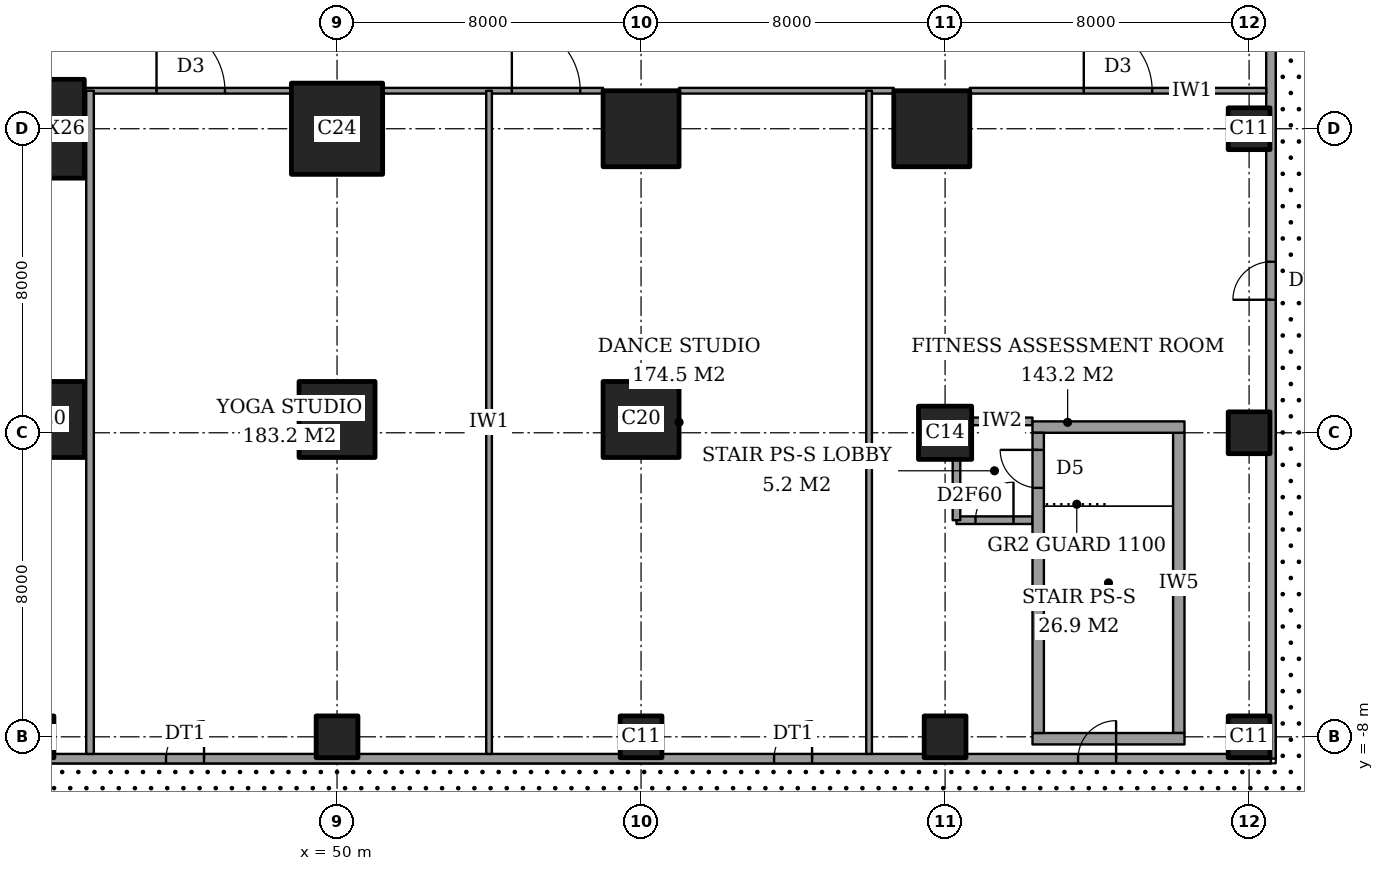
"""IFC4 building model, lengths in metres.
Left out: names, types, materials, properties, quantities, classifications, styles, units other than length and angle.
Written with IfcOpenShell. Run it as: python <this file> out.ifc"""

import sys

from ifc_helpers import new_model, si_unit, direction, frame, frame_2d, origin, origin_2d, place, context, subcontext, project, spatial, rectangle, extrude, element, fill, save


model = new_model("IFC4")
c1 = context("Model", 3, precision=1e-05, world=origin(), true_north=direction((0.0, 1.0)))
c2 = subcontext(c1, "Body", "Model", "MODEL_VIEW")
j1 = project(units=[si_unit("LENGTHUNIT", "METRE"), si_unit("PLANEANGLEUNIT", "RADIAN")], contexts=[c1])
p1 = place(None, origin())
s1 = spatial("IfcSite", under=j1, at=p1, CompositionType="ELEMENT")
p2 = place(p1, origin())
s2 = spatial("IfcBuilding", under=s1, at=p2, CompositionType="ELEMENT")
p3 = place(p2, frame((0.0, 0.0, 11.0)))
s3 = spatial("IfcBuildingStorey", under=s2, at=p3, CompositionType="ELEMENT", Elevation=11.0)
p4 = place(p3, frame((42.0, -8.0, 0.0), z_axis=(0.0, 0.0, 1.0), x_axis=(1.0, 0.0, 0.0)))
e1 = element("IfcColumn", 1, at=p4, inside=s3, PredefinedType="COLUMN", context=c2, shape_type="SweptSolid", body=[
    extrude(rectangle(XDim=1.1, YDim=1.1, at=origin_2d()), origin(), (0.0, 0.0, 1.0), 5.0),
])
p5 = place(p3, frame((42.35, 0.35, 0.0), z_axis=(0.0, 0.0, 1.0), x_axis=(1.0, 0.0, 0.0)))
e2 = element("IfcColumn", 2, at=p5, inside=s3, PredefinedType="COLUMN", context=c2, shape_type="SweptSolid", body=[
    extrude(rectangle(XDim=2.0, YDim=2.0, at=origin_2d()), origin(), (0.0, 0.0, 1.0), 5.0),
])
p6 = place(p3, frame((42.35, 8.0, 0.0), z_axis=(0.0, 0.0, 1.0), x_axis=(1.0, 0.0, 0.0)))
e3 = element("IfcColumn", 3, at=p6, inside=s3, PredefinedType="COLUMN", context=c2, shape_type="SweptSolid", body=[
    extrude(rectangle(XDim=2.0, YDim=2.6, at=origin_2d()), origin(), (0.0, 0.0, 1.0), 5.0),
])
p7 = place(p3, frame((50.0, -8.0, 0.0), z_axis=(0.0, 0.0, 1.0), x_axis=(1.0, 0.0, 0.0)))
e4 = element("IfcColumn", 4, at=p7, inside=s3, PredefinedType="COLUMN", context=c2, shape_type="SweptSolid", body=[
    extrude(rectangle(XDim=1.1, YDim=1.1, at=origin_2d()), origin(), (0.0, 0.0, 1.0), 5.0),
])
p8 = place(p3, frame((50.0, 0.35, 0.0), z_axis=(0.0, 0.0, 1.0), x_axis=(1.0, 0.0, 0.0)))
e5 = element("IfcColumn", 5, at=p8, inside=s3, PredefinedType="COLUMN", context=c2, shape_type="SweptSolid", body=[
    extrude(rectangle(XDim=2.0, YDim=2.0, at=origin_2d()), origin(), (0.0, 0.0, 1.0), 5.0),
])
p9 = place(p3, frame((50.0, 8.0, 0.0), z_axis=(0.0, 0.0, 1.0), x_axis=(1.0, 0.0, 0.0)))
e6 = element("IfcColumn", 6, at=p9, inside=s3, PredefinedType="COLUMN", context=c2, shape_type="SweptSolid", body=[
    extrude(rectangle(XDim=2.4, YDim=2.4, at=origin_2d()), origin(), (0.0, 0.0, 1.0), 5.0),
])
p10 = place(p3, frame((58.0, -8.0, 0.0), z_axis=(0.0, 0.0, 1.0), x_axis=(1.0, 0.0, 0.0)))
e7 = element("IfcColumn", 7, at=p10, inside=s3, PredefinedType="COLUMN", context=c2, shape_type="SweptSolid", body=[
    extrude(rectangle(XDim=1.1, YDim=1.1, at=origin_2d()), origin(), (0.0, 0.0, 1.0), 5.0),
])
for number, where, z_axis, x_axis in (
    (8, (58.0, 0.35, 0.0), (0.0, 0.0, 1.0), (1.0, 0.0, 0.0)),
    (9, (58.0, 8.0, 0.0), (0.0, 0.0, 1.0), (1.0, 0.0, 0.0)),
):
    element("IfcColumn", number, at=place(p3, frame(where, z_axis=z_axis, x_axis=x_axis)), inside=s3, PredefinedType="COLUMN", context=c2, shape_type="SweptSolid", body=[
        extrude(rectangle(XDim=2.0, YDim=2.0, at=origin_2d()), origin(), (0.0, 0.0, 1.0), 5.0),
    ])
p11 = place(p3, frame((66.0, -8.0, 0.0), z_axis=(0.0, 0.0, 1.0), x_axis=(1.0, 0.0, 0.0)))
e10 = element("IfcColumn", 10, at=p11, inside=s3, PredefinedType="COLUMN", context=c2, shape_type="SweptSolid", body=[
    extrude(rectangle(XDim=1.1, YDim=1.1, at=origin_2d()), origin(), (0.0, 0.0, 1.0), 5.0),
])
p12 = place(p3, frame((66.0, 0.0, 0.0), z_axis=(0.0, 0.0, 1.0), x_axis=(1.0, 0.0, 0.0)))
e11 = element("IfcColumn", 11, at=p12, inside=s3, PredefinedType="COLUMN", context=c2, shape_type="SweptSolid", body=[
    extrude(rectangle(XDim=1.4, YDim=1.4, at=origin_2d()), origin(), (0.0, 0.0, 1.0), 5.0),
])
p13 = place(p3, frame((65.65, 8.0, 0.0), z_axis=(0.0, 0.0, 1.0), x_axis=(1.0, 0.0, 0.0)))
e12 = element("IfcColumn", 12, at=p13, inside=s3, PredefinedType="COLUMN", context=c2, shape_type="SweptSolid", body=[
    extrude(rectangle(XDim=2.0, YDim=2.0, at=origin_2d()), origin(), (0.0, 0.0, 1.0), 5.0),
])
for number, where, z_axis, x_axis in (
    (13, (74.0, -8.0, 0.0), (0.0, 0.0, 1.0), (1.0, 0.0, 0.0)),
    (14, (74.0, 0.0, 0.0), (0.0, 0.0, 1.0), (1.0, 0.0, 0.0)),
    (15, (74.0, 8.0, 0.0), (0.0, 0.0, 1.0), (1.0, 0.0, 0.0)),
):
    element("IfcColumn", number, at=place(p3, frame(where, z_axis=z_axis, x_axis=x_axis)), inside=s3, PredefinedType="COLUMN", context=c2, shape_type="SweptSolid", body=[
        extrude(rectangle(XDim=1.1, YDim=1.1, at=origin_2d()), origin(), (0.0, 0.0, 1.0), 5.0),
    ])
p14 = place(p3, frame((74.575, -8.575, 0.0), z_axis=(0.0, 0.0, 1.0), x_axis=(0.0, 1.0, 0.0)))
e16 = element("IfcWall", 16, at=p14, inside=s3, PredefinedType="SOLIDWALL", context=c2, shape_type="SweptSolid", body=[
    extrude(rectangle(XDim=65.15, YDim=0.25, at=frame_2d((32.575, 0.0))), origin(), (0.0, 0.0, 1.0), 5.0),
])
p15 = place(p14, frame((12.075, 0.0, 0.0)))
e17 = element("IfcOpeningElement", 17, at=p15, cuts=e16, PredefinedType="OPENING", context=c2, shape_type="SweptSolid", body=[
    extrude(rectangle(XDim=1.0, YDim=2.4, at=frame_2d((0.5, 1.2))), frame((0.0, 0.135, 0.0), z_axis=(0.0, -1.0, 0.0), x_axis=(1.0, 0.0, 0.0)), (0.0, 0.0, 1.0), 0.27),
])
p16 = place(p14, frame((28.075, 0.0, 0.0)))
e18 = element("IfcOpeningElement", 18, at=p16, cuts=e16, PredefinedType="OPENING", context=c2, shape_type="SweptSolid", body=[
    extrude(rectangle(XDim=1.0, YDim=2.4, at=frame_2d((0.5, 1.2))), frame((0.0, 0.135, 0.0), z_axis=(0.0, -1.0, 0.0), x_axis=(1.0, 0.0, 0.0)), (0.0, 0.0, 1.0), 0.27),
])
p17 = place(p14, frame((41.275, 0.0, 0.0)))
e19 = element("IfcOpeningElement", 19, at=p17, cuts=e16, PredefinedType="OPENING", context=c2, shape_type="SweptSolid", body=[
    extrude(rectangle(XDim=1.0, YDim=2.4, at=frame_2d((0.5, 1.2))), frame((0.0, 0.135, 0.0), z_axis=(0.0, -1.0, 0.0), x_axis=(1.0, 0.0, 0.0)), (0.0, 0.0, 1.0), 0.27),
])
p18 = place(p3, frame((-8.575, -8.575, 0.0), z_axis=(0.0, 0.0, 1.0), x_axis=(1.0, 0.0, 0.0)))
e20 = element("IfcWall", 20, at=p18, inside=s3, PredefinedType="SOLIDWALL", context=c2, shape_type="SweptSolid", body=[
    extrude(rectangle(XDim=83.15, YDim=0.25, at=frame_2d((41.575, 0.0))), origin(), (0.0, 0.0, 1.0), 5.0),
])
p19 = place(p18, frame((12.075, 0.0, 0.0)))
e21 = element("IfcOpeningElement", 21, at=p19, cuts=e20, PredefinedType="OPENING", context=c2, shape_type="SweptSolid", body=[
    extrude(rectangle(XDim=1.0, YDim=2.4, at=frame_2d((0.5, 1.2))), frame((0.0, 0.135, 0.0), z_axis=(0.0, -1.0, 0.0), x_axis=(1.0, 0.0, 0.0)), (0.0, 0.0, 1.0), 0.27),
])
p20 = place(p18, frame((20.075, 0.0, 0.0)))
e22 = element("IfcOpeningElement", 22, at=p20, cuts=e20, PredefinedType="OPENING", context=c2, shape_type="SweptSolid", body=[
    extrude(rectangle(XDim=1.0, YDim=2.4, at=frame_2d((0.5, 1.2))), frame((0.0, 0.135, 0.0), z_axis=(0.0, -1.0, 0.0), x_axis=(1.0, 0.0, 0.0)), (0.0, 0.0, 1.0), 0.27),
])
p21 = place(p18, frame((28.075, 0.0, 0.0)))
e23 = element("IfcOpeningElement", 23, at=p21, cuts=e20, PredefinedType="OPENING", context=c2, shape_type="SweptSolid", body=[
    extrude(rectangle(XDim=1.0, YDim=2.4, at=frame_2d((0.5, 1.2))), frame((0.0, 0.135, 0.0), z_axis=(0.0, -1.0, 0.0), x_axis=(1.0, 0.0, 0.0)), (0.0, 0.0, 1.0), 0.27),
])
p22 = place(p18, frame((54.075, 0.0, 0.0)))
e24 = element("IfcOpeningElement", 24, at=p22, cuts=e20, PredefinedType="OPENING", context=c2, shape_type="SweptSolid", body=[
    extrude(rectangle(XDim=1.0, YDim=2.4, at=frame_2d((0.5, 1.2))), frame((0.0, 0.135, 0.0), z_axis=(0.0, -1.0, 0.0), x_axis=(1.0, 0.0, 0.0)), (0.0, 0.0, 1.0), 0.27),
])
p23 = place(p18, frame((70.075, 0.0, 0.0)))
e25 = element("IfcOpeningElement", 25, at=p23, cuts=e20, PredefinedType="OPENING", context=c2, shape_type="SweptSolid", body=[
    extrude(rectangle(XDim=1.0, YDim=2.4, at=frame_2d((0.5, 1.2))), frame((0.0, 0.135, 0.0), z_axis=(0.0, -1.0, 0.0), x_axis=(1.0, 0.0, 0.0)), (0.0, 0.0, 1.0), 0.27),
])
p24 = place(p18, frame((78.075, 0.0, 0.0)))
e26 = element("IfcOpeningElement", 26, at=p24, cuts=e20, PredefinedType="OPENING", context=c2, shape_type="SweptSolid", body=[
    extrude(rectangle(XDim=1.0, YDim=2.4, at=frame_2d((0.5, 1.2))), frame((0.0, 0.135, 0.0), z_axis=(0.0, -1.0, 0.0), x_axis=(1.0, 0.0, 0.0)), (0.0, 0.0, 1.0), 0.27),
])
p25 = place(p3, frame((66.3, -2.3, 0.0), z_axis=(0.0, 0.0, 1.0), x_axis=(1.0, 0.0, 0.0)))
e27 = element("IfcWall", 27, at=p25, inside=s3, PredefinedType="PARTITIONING", context=c2, shape_type="SweptSolid", body=[
    extrude(rectangle(XDim=2.0, YDim=0.2, at=frame_2d((1.0, 0.0))), origin(), (0.0, 0.0, 1.0), 4.7),
])
p26 = place(p25, frame((0.5, 0.0, 0.0)))
e28 = element("IfcOpeningElement", 28, at=p26, cuts=e27, PredefinedType="OPENING", context=c2, shape_type="SweptSolid", body=[
    extrude(rectangle(XDim=1.0, YDim=2.1, at=frame_2d((0.5, 1.05))), frame((0.0, 0.11, 0.0), z_axis=(0.0, -1.0, 0.0), x_axis=(1.0, 0.0, 0.0)), (0.0, 0.0, 1.0), 0.22),
])
p27 = place(p3, frame((66.7, 0.3, 0.0), z_axis=(0.0, 0.0, 1.0), x_axis=(1.0, 0.0, 0.0)))
e29 = element("IfcWall", 29, at=p27, inside=s3, PredefinedType="PARTITIONING", context=c2, shape_type="SweptSolid", body=[
    extrude(rectangle(XDim=1.6, YDim=0.2, at=frame_2d((0.8, 0.0))), origin(), (0.0, 0.0, 1.0), 3.3),
])
p28 = place(p3, frame((43.35, 9.0, 0.0), z_axis=(0.0, 0.0, 1.0), x_axis=(1.0, 0.0, 0.0)))
e30 = element("IfcWall", 30, at=p28, inside=s3, PredefinedType="PARTITIONING", context=c2, shape_type="SweptSolid", body=[
    extrude(rectangle(XDim=5.45, YDim=0.15, at=frame_2d((2.725, 0.0))), origin(), (0.0, 0.0, 1.0), 4.7),
])
p29 = place(p28, frame((1.9, 0.0, 0.0)))
e31 = element("IfcOpeningElement", 31, at=p29, cuts=e30, PredefinedType="OPENING", context=c2, shape_type="SweptSolid", body=[
    extrude(rectangle(XDim=1.8, YDim=2.1, at=frame_2d((0.9, 1.05))), frame((0.0, 0.085, 0.0), z_axis=(0.0, -1.0, 0.0), x_axis=(1.0, 0.0, 0.0)), (0.0, 0.0, 1.0), 0.17),
])
p30 = place(p3, frame((51.2, 9.0, 0.0), z_axis=(0.0, 0.0, 1.0), x_axis=(1.0, 0.0, 0.0)))
e32 = element("IfcWall", 32, at=p30, inside=s3, PredefinedType="PARTITIONING", context=c2, shape_type="SweptSolid", body=[
    extrude(rectangle(XDim=5.8, YDim=0.15, at=frame_2d((2.9, 0.0))), origin(), (0.0, 0.0, 1.0), 4.7),
])
p31 = place(p30, frame((3.4, 0.0, 0.0)))
e33 = element("IfcOpeningElement", 33, at=p31, cuts=e32, PredefinedType="OPENING", context=c2, shape_type="SweptSolid", body=[
    extrude(rectangle(XDim=1.8, YDim=2.1, at=frame_2d((0.9, 1.05))), frame((0.0, 0.085, 0.0), z_axis=(0.0, -1.0, 0.0), x_axis=(1.0, 0.0, 0.0)), (0.0, 0.0, 1.0), 0.17),
])
p32 = place(p3, frame((59.0, 9.0, 0.0), z_axis=(0.0, 0.0, 1.0), x_axis=(1.0, 0.0, 0.0)))
e34 = element("IfcWall", 34, at=p32, inside=s3, PredefinedType="PARTITIONING", context=c2, shape_type="SweptSolid", body=[
    extrude(rectangle(XDim=5.65, YDim=0.15, at=frame_2d((2.825, 0.0))), origin(), (0.0, 0.0, 1.0), 4.7),
])
p33 = place(p3, frame((66.65, 9.0, 0.0), z_axis=(0.0, 0.0, 1.0), x_axis=(1.0, 0.0, 0.0)))
e35 = element("IfcWall", 35, at=p33, inside=s3, PredefinedType="PARTITIONING", context=c2, shape_type="SweptSolid", body=[
    extrude(rectangle(XDim=7.8, YDim=0.15, at=frame_2d((3.9, 0.0))), origin(), (0.0, 0.0, 1.0), 4.7),
])
p34 = place(p33, frame((3.0, 0.0, 0.0)))
e36 = element("IfcOpeningElement", 36, at=p34, cuts=e35, PredefinedType="OPENING", context=c2, shape_type="SweptSolid", body=[
    extrude(rectangle(XDim=1.8, YDim=2.1, at=frame_2d((0.9, 1.05))), frame((0.0, 0.085, 0.0), z_axis=(0.0, -1.0, 0.0), x_axis=(1.0, 0.0, 0.0)), (0.0, 0.0, 1.0), 0.17),
])
p35 = place(p3, frame((43.5, -8.45, 0.0), z_axis=(0.0, 0.0, 1.0), x_axis=(0.0, 1.0, 0.0)))
e37 = element("IfcWall", 37, at=p35, inside=s3, PredefinedType="PARTITIONING", context=c2, shape_type="SweptSolid", body=[
    extrude(rectangle(XDim=17.45, YDim=0.2, at=frame_2d((8.725, 0.0))), origin(), (0.0, 0.0, 1.0), 4.7),
])
for number, where, z_axis, x_axis in (
    (38, (54.0, -8.45, 0.0), (0.0, 0.0, 1.0), (0.0, 1.0, 0.0)),
    (39, (64.0, -8.45, 0.0), (0.0, 0.0, 1.0), (0.0, 1.0, 0.0)),
):
    element("IfcWall", number, at=place(p3, frame(where, z_axis=z_axis, x_axis=x_axis)), inside=s3, PredefinedType="PARTITIONING", context=c2, shape_type="SweptSolid", body=[
        extrude(rectangle(XDim=17.45, YDim=0.15, at=frame_2d((8.725, 0.0))), origin(), (0.0, 0.0, 1.0), 4.7),
    ])
p36 = place(p3, frame((66.3, -2.3, 0.0), z_axis=(0.0, 0.0, 1.0), x_axis=(0.0, 1.0, 0.0)))
e40 = element("IfcWall", 40, at=p36, inside=s3, PredefinedType="PARTITIONING", context=c2, shape_type="SweptSolid", body=[
    extrude(rectangle(XDim=1.6, YDim=0.2, at=frame_2d((0.8, 0.0))), origin(), (0.0, 0.0, 1.0), 3.3),
])
for number, where, z_axis, x_axis in (
    (41, (68.3, -8.05, 0.0), (0.0, 0.0, 1.0), (1.0, 0.0, 0.0)),
    (42, (68.3, 0.15, 0.0), (0.0, 0.0, 1.0), (1.0, 0.0, 0.0)),
):
    element("IfcWall", number, at=place(p3, frame(where, z_axis=z_axis, x_axis=x_axis)), inside=s3, PredefinedType="PARTITIONING", context=c2, shape_type="SweptSolid", body=[
        extrude(rectangle(XDim=4.0, YDim=0.3, at=frame_2d((2.0, 0.0))), origin(), (0.0, 0.0, 1.0), 4.7),
    ])
p37 = place(p3, frame((68.45, -7.9, 0.0), z_axis=(0.0, 0.0, 1.0), x_axis=(0.0, 1.0, 0.0)))
e43 = element("IfcWall", 43, at=p37, inside=s3, PredefinedType="PARTITIONING", context=c2, shape_type="SweptSolid", body=[
    extrude(rectangle(XDim=7.9, YDim=0.3, at=frame_2d((3.95, 0.0))), origin(), (0.0, 0.0, 1.0), 4.7),
])
p38 = place(p37, frame((6.45, 0.0, 0.0)))
e44 = element("IfcOpeningElement", 44, at=p38, cuts=e43, PredefinedType="OPENING", context=c2, shape_type="SweptSolid", body=[
    extrude(rectangle(XDim=1.0, YDim=2.1, at=frame_2d((0.5, 1.05))), frame((0.0, 0.16, 0.0), z_axis=(0.0, -1.0, 0.0), x_axis=(1.0, 0.0, 0.0)), (0.0, 0.0, 1.0), 0.32),
])
p39 = place(p3, frame((72.15, -7.9, 0.0), z_axis=(0.0, 0.0, 1.0), x_axis=(0.0, 1.0, 0.0)))
e45 = element("IfcWall", 45, at=p39, inside=s3, PredefinedType="PARTITIONING", context=c2, shape_type="SweptSolid", body=[
    extrude(rectangle(XDim=7.9, YDim=0.3, at=frame_2d((3.95, 0.0))), origin(), (0.0, 0.0, 1.0), 4.7),
])
p40 = place(p15, origin())
e46 = element("IfcDoor", 46, at=p40, inside=s3, OperationType="SINGLE_SWING_RIGHT", PredefinedType="DOOR", context=c2, shape_type="SweptSolid", body=[
    extrude(rectangle(XDim=1.0, YDim=2.4, at=frame_2d((0.5, 1.2))), frame((0.0, 0.025, 0.0), z_axis=(0.0, -1.0, 0.0), x_axis=(1.0, 0.0, 0.0)), (0.0, 0.0, 1.0), 0.05),
])
fill(e17, e46)
p41 = place(p22, origin())
e47 = element("IfcDoor", 47, at=p41, inside=s3, OperationType="SINGLE_SWING_LEFT", PredefinedType="DOOR", context=c2, shape_type="SweptSolid", body=[
    extrude(rectangle(XDim=1.0, YDim=2.4, at=frame_2d((0.5, 1.2))), frame((0.0, 0.025, 0.0), z_axis=(0.0, -1.0, 0.0), x_axis=(1.0, 0.0, 0.0)), (0.0, 0.0, 1.0), 0.05),
])
fill(e24, e47)
p42 = place(p23, origin())
e48 = element("IfcDoor", 48, at=p42, inside=s3, OperationType="SINGLE_SWING_LEFT", PredefinedType="DOOR", context=c2, shape_type="SweptSolid", body=[
    extrude(rectangle(XDim=1.0, YDim=2.4, at=frame_2d((0.5, 1.2))), frame((0.0, 0.025, 0.0), z_axis=(0.0, -1.0, 0.0), x_axis=(1.0, 0.0, 0.0)), (0.0, 0.0, 1.0), 0.05),
])
fill(e25, e48)
p43 = place(p24, origin())
e49 = element("IfcDoor", 49, at=p43, inside=s3, OperationType="SINGLE_SWING_LEFT", PredefinedType="DOOR", context=c2, shape_type="SweptSolid", body=[
    extrude(rectangle(XDim=1.0, YDim=2.4, at=frame_2d((0.5, 1.2))), frame((0.0, 0.025, 0.0), z_axis=(0.0, -1.0, 0.0), x_axis=(1.0, 0.0, 0.0)), (0.0, 0.0, 1.0), 0.05),
])
fill(e26, e49)
p44 = place(p29, origin())
e50 = element("IfcDoor", 50, at=p44, inside=s3, OperationType="DOUBLE_DOOR_DOUBLE_SWING", PredefinedType="DOOR", context=c2, shape_type="SweptSolid", body=[
    extrude(rectangle(XDim=1.8, YDim=2.1, at=frame_2d((0.9, 1.05))), frame((0.0, 0.025, 0.0), z_axis=(0.0, -1.0, 0.0), x_axis=(1.0, 0.0, 0.0)), (0.0, 0.0, 1.0), 0.05),
])
fill(e31, e50)
p45 = place(p31, origin())
e51 = element("IfcDoor", 51, at=p45, inside=s3, OperationType="DOUBLE_DOOR_DOUBLE_SWING", PredefinedType="DOOR", context=c2, shape_type="SweptSolid", body=[
    extrude(rectangle(XDim=1.8, YDim=2.1, at=frame_2d((0.9, 1.05))), frame((0.0, 0.025, 0.0), z_axis=(0.0, -1.0, 0.0), x_axis=(1.0, 0.0, 0.0)), (0.0, 0.0, 1.0), 0.05),
])
fill(e33, e51)
p46 = place(p34, origin())
e52 = element("IfcDoor", 52, at=p46, inside=s3, OperationType="DOUBLE_DOOR_DOUBLE_SWING", PredefinedType="DOOR", context=c2, shape_type="SweptSolid", body=[
    extrude(rectangle(XDim=1.8, YDim=2.1, at=frame_2d((0.9, 1.05))), frame((0.0, 0.025, 0.0), z_axis=(0.0, -1.0, 0.0), x_axis=(1.0, 0.0, 0.0)), (0.0, 0.0, 1.0), 0.05),
])
fill(e36, e52)
p47 = place(p26, origin())
e53 = element("IfcDoor", 53, at=p47, inside=s3, OperationType="SINGLE_SWING_LEFT", PredefinedType="DOOR", context=c2, shape_type="SweptSolid", body=[
    extrude(rectangle(XDim=1.0, YDim=2.1, at=frame_2d((0.5, 1.05))), frame((0.0, 0.025, 0.0), z_axis=(0.0, -1.0, 0.0), x_axis=(1.0, 0.0, 0.0)), (0.0, 0.0, 1.0), 0.05),
])
fill(e28, e53)
p48 = place(p38, origin())
e54 = element("IfcDoor", 54, at=p48, inside=s3, OperationType="SINGLE_SWING_LEFT", PredefinedType="DOOR", context=c2, shape_type="SweptSolid", body=[
    extrude(rectangle(XDim=1.0, YDim=2.1, at=frame_2d((0.5, 1.05))), frame((0.0, 0.025, 0.0), z_axis=(0.0, -1.0, 0.0), x_axis=(1.0, 0.0, 0.0)), (0.0, 0.0, 1.0), 0.05),
])
fill(e44, e54)
save(model, sys.argv[1])
